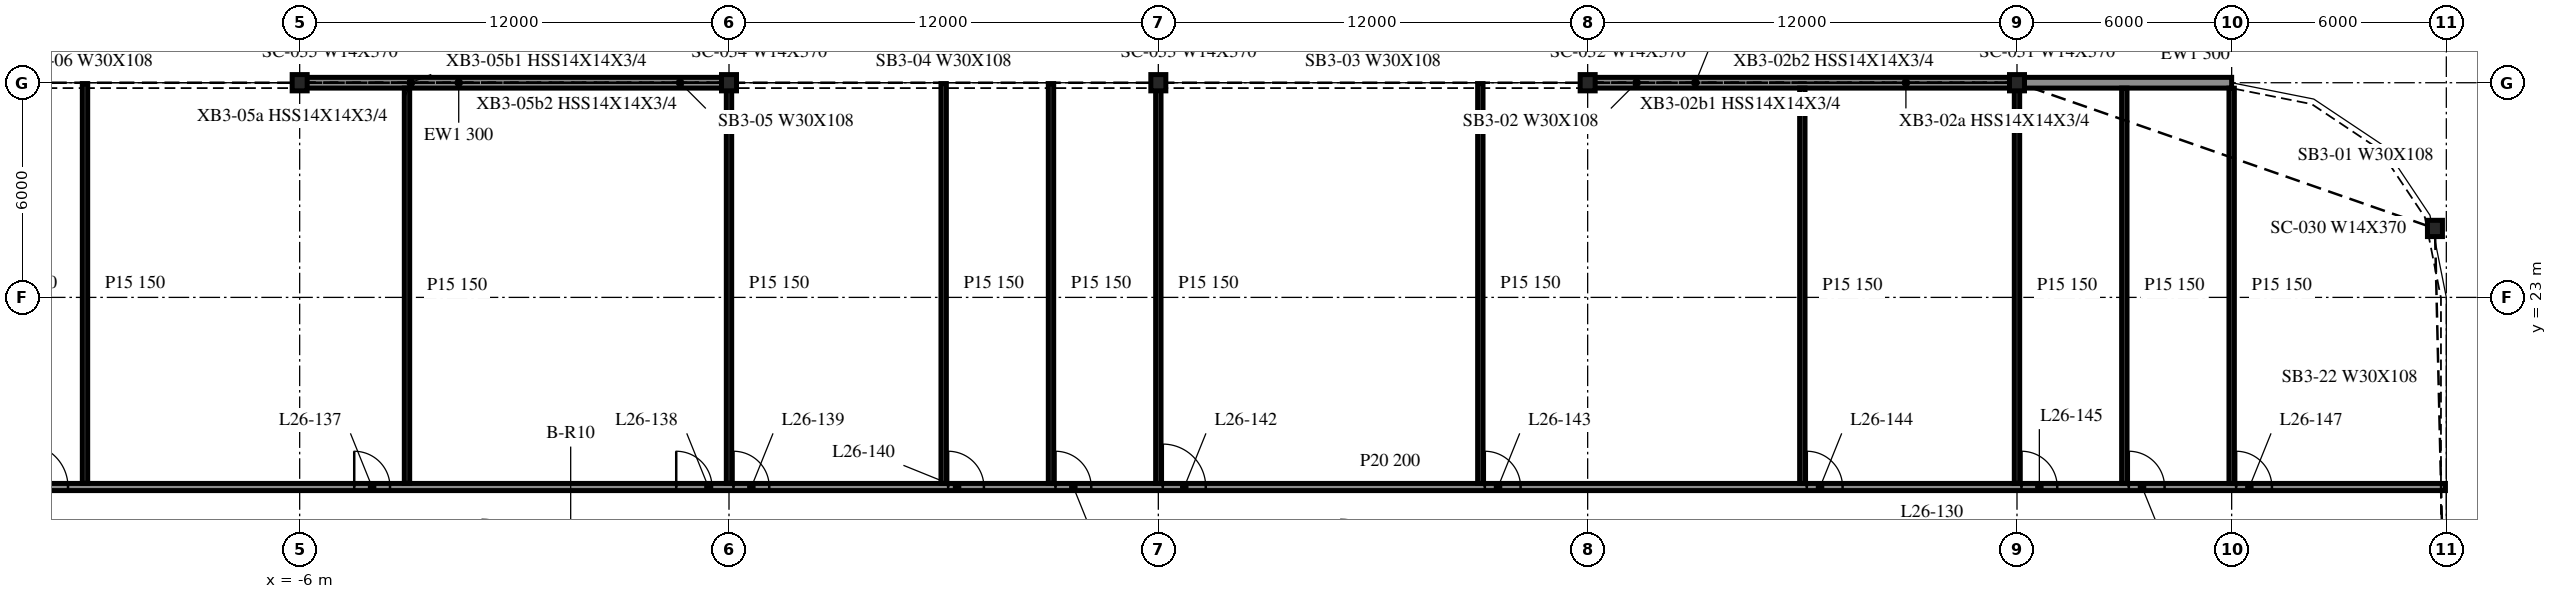
"""IFC4 building model, lengths in metres.
Left out: names, types, materials, properties, quantities, classifications, styles, units other than length and angle.
Written with IfcOpenShell. Run it as: python <this file> out.ifc"""

import sys

from ifc_helpers import new_model, si_unit, direction, frame, frame_2d, origin, origin_2d, place, context, subcontext, project, spatial, rectangle, i_section, extrude, element, fill, save


model = new_model("IFC4")
c1 = context("Model", 3, precision=1e-05, world=origin(), true_north=direction((0.0, 1.0)))
c2 = subcontext(c1, "Body", "Model", "MODEL_VIEW")
j1 = project(units=[si_unit("LENGTHUNIT", "METRE"), si_unit("PLANEANGLEUNIT", "RADIAN")], contexts=[c1])
p1 = place(None, origin())
s1 = spatial("IfcSite", under=j1, at=p1, CompositionType="ELEMENT")
p2 = place(p1, origin())
s2 = spatial("IfcBuilding", under=s1, at=p2, CompositionType="ELEMENT")
p3 = place(p2, frame((0.0, 0.0, 113.5)))
s3 = spatial("IfcBuildingStorey", under=s2, at=p3, CompositionType="ELEMENT", Elevation=113.5)
for number, where, z_axis, x_axis in (
    (1, (53.682, 24.927, -0.34), (0.0, 0.0, 1.0), (1.0, 0.0, 0.0)),
    (2, (42.0, 29.0, -0.34), (0.0, 0.0, 1.0), (1.0, 0.0, 0.0)),
    (3, (30.0, 29.0, -0.34), (0.0, 0.0, 1.0), (1.0, 0.0, 0.0)),
    (4, (18.0, 29.0, -0.34), (0.0, 0.0, 1.0), (1.0, 0.0, 0.0)),
    (5, (6.0, 29.0, -0.34), (0.0, 0.0, 1.0), (1.0, 0.0, 0.0)),
    (6, (-6.0, 29.0, -0.34), (0.0, 0.0, 1.0), (1.0, 0.0, 0.0)),
):
    element("IfcColumn", number, at=place(p3, frame(where, z_axis=z_axis, x_axis=x_axis)), inside=s3, PredefinedType="COLUMN", context=c2, shape_type="SweptSolid", body=[
        extrude(i_section(OverallWidth=0.419, OverallDepth=0.455, WebThickness=0.042, FlangeThickness=0.068, at=origin_2d()), origin(), (0.0, 0.0, 1.0), 3.89),
    ])
p4 = place(p3, frame((48.0, 29.0, 0.0), z_axis=(0.0, 0.0, 1.0), x_axis=(-1.0, 0.0, 0.0)))
e7 = element("IfcWall", 7, at=p4, inside=s3, PredefinedType="NOTDEFINED", context=c2, shape_type="SweptSolid", body=[
    extrude(rectangle(XDim=5.979, YDim=0.3, at=frame_2d((2.99, 0.0))), origin(), (0.0, 0.0, 1.0), 3.55),
])
for number, where, z_axis, x_axis in (
    (8, (41.979, 29.0, 0.0), (0.0, 0.0, 1.0), (-1.0, 0.0, 0.0)),
    (9, (5.979, 29.0, 0.0), (0.0, 0.0, 1.0), (-1.0, 0.0, 0.0)),
):
    element("IfcWall", number, at=place(p3, frame(where, z_axis=z_axis, x_axis=x_axis)), inside=s3, PredefinedType="NOTDEFINED", context=c2, shape_type="SweptSolid", body=[
        extrude(rectangle(XDim=11.958, YDim=0.3, at=frame_2d((5.979, 0.0))), origin(), (0.0, 0.0, 1.0), 3.55),
    ])
p5 = place(p3, frame((-41.975, 17.7, 0.0), z_axis=(0.0, 0.0, 1.0), x_axis=(1.0, 0.0, 0.0)))
e10 = element("IfcWall", 10, at=p5, inside=s3, PredefinedType="PARTITIONING", context=c2, shape_type="SweptSolid", body=[
    extrude(rectangle(XDim=95.95, YDim=0.2, at=frame_2d((47.975, 0.0))), origin(), (0.0, 0.0, 1.0), 3.55),
])
p6 = place(p5, frame((7.5, 0.0, 0.0)))
e11 = element("IfcOpeningElement", 11, at=p6, cuts=e10, PredefinedType="OPENING", context=c2, shape_type="SweptSolid", body=[
    extrude(rectangle(XDim=1.0, YDim=2.1, at=frame_2d((0.5, 1.05))), frame((0.0, 0.11, 0.0), z_axis=(0.0, -1.0, 0.0), x_axis=(1.0, 0.0, 0.0)), (0.0, 0.0, 1.0), 0.22),
])
p7 = place(p5, frame((16.5, 0.0, 0.0)))
e12 = element("IfcOpeningElement", 12, at=p7, cuts=e10, PredefinedType="OPENING", context=c2, shape_type="SweptSolid", body=[
    extrude(rectangle(XDim=1.0, YDim=2.1, at=frame_2d((0.5, 1.05))), frame((0.0, 0.11, 0.0), z_axis=(0.0, -1.0, 0.0), x_axis=(1.0, 0.0, 0.0)), (0.0, 0.0, 1.0), 0.22),
])
p8 = place(p5, frame((22.5, 0.0, 0.0)))
e13 = element("IfcOpeningElement", 13, at=p8, cuts=e10, PredefinedType="OPENING", context=c2, shape_type="SweptSolid", body=[
    extrude(rectangle(XDim=1.0, YDim=2.1, at=frame_2d((0.5, 1.05))), frame((0.0, 0.11, 0.0), z_axis=(0.0, -1.0, 0.0), x_axis=(1.0, 0.0, 0.0)), (0.0, 0.0, 1.0), 0.22),
])
p9 = place(p5, frame((25.5, 0.0, 0.0)))
e14 = element("IfcOpeningElement", 14, at=p9, cuts=e10, PredefinedType="OPENING", context=c2, shape_type="SweptSolid", body=[
    extrude(rectangle(XDim=1.0, YDim=2.1, at=frame_2d((0.5, 1.05))), frame((0.0, 0.11, 0.0), z_axis=(0.0, -1.0, 0.0), x_axis=(1.0, 0.0, 0.0)), (0.0, 0.0, 1.0), 0.22),
])
p10 = place(p5, frame((28.3, 0.0, 0.0)))
e15 = element("IfcOpeningElement", 15, at=p10, cuts=e10, PredefinedType="OPENING", context=c2, shape_type="SweptSolid", body=[
    extrude(rectangle(XDim=1.2, YDim=2.1, at=frame_2d((0.6, 1.05))), frame((0.0, 0.11, 0.0), z_axis=(0.0, -1.0, 0.0), x_axis=(1.0, 0.0, 0.0)), (0.0, 0.0, 1.0), 0.22),
])
p11 = place(p5, frame((37.5, 0.0, 0.0)))
e16 = element("IfcOpeningElement", 16, at=p11, cuts=e10, PredefinedType="OPENING", context=c2, shape_type="SweptSolid", body=[
    extrude(rectangle(XDim=1.0, YDim=2.1, at=frame_2d((0.5, 1.05))), frame((0.0, 0.11, 0.0), z_axis=(0.0, -1.0, 0.0), x_axis=(1.0, 0.0, 0.0)), (0.0, 0.0, 1.0), 0.22),
])
p12 = place(p5, frame((46.5, 0.0, 0.0)))
e17 = element("IfcOpeningElement", 17, at=p12, cuts=e10, PredefinedType="OPENING", context=c2, shape_type="SweptSolid", body=[
    extrude(rectangle(XDim=1.0, YDim=2.1, at=frame_2d((0.5, 1.05))), frame((0.0, 0.11, 0.0), z_axis=(0.0, -1.0, 0.0), x_axis=(1.0, 0.0, 0.0)), (0.0, 0.0, 1.0), 0.22),
])
p13 = place(p5, frame((48.1, 0.0, 0.0)))
e18 = element("IfcOpeningElement", 18, at=p13, cuts=e10, PredefinedType="OPENING", context=c2, shape_type="SweptSolid", body=[
    extrude(rectangle(XDim=1.0, YDim=2.1, at=frame_2d((0.5, 1.05))), frame((0.0, 0.11, 0.0), z_axis=(0.0, -1.0, 0.0), x_axis=(1.0, 0.0, 0.0)), (0.0, 0.0, 1.0), 0.22),
])
p14 = place(p5, frame((54.1, 0.0, 0.0)))
e19 = element("IfcOpeningElement", 19, at=p14, cuts=e10, PredefinedType="OPENING", context=c2, shape_type="SweptSolid", body=[
    extrude(rectangle(XDim=1.0, YDim=2.1, at=frame_2d((0.5, 1.05))), frame((0.0, 0.11, 0.0), z_axis=(0.0, -1.0, 0.0), x_axis=(1.0, 0.0, 0.0)), (0.0, 0.0, 1.0), 0.22),
])
p15 = place(p5, frame((57.1, 0.0, 0.0)))
e20 = element("IfcOpeningElement", 20, at=p15, cuts=e10, PredefinedType="OPENING", context=c2, shape_type="SweptSolid", body=[
    extrude(rectangle(XDim=1.0, YDim=2.1, at=frame_2d((0.5, 1.05))), frame((0.0, 0.11, 0.0), z_axis=(0.0, -1.0, 0.0), x_axis=(1.0, 0.0, 0.0)), (0.0, 0.0, 1.0), 0.22),
])
p16 = place(p5, frame((60.1, 0.0, 0.0)))
e21 = element("IfcOpeningElement", 21, at=p16, cuts=e10, PredefinedType="OPENING", context=c2, shape_type="SweptSolid", body=[
    extrude(rectangle(XDim=1.2, YDim=2.1, at=frame_2d((0.6, 1.05))), frame((0.0, 0.11, 0.0), z_axis=(0.0, -1.0, 0.0), x_axis=(1.0, 0.0, 0.0)), (0.0, 0.0, 1.0), 0.22),
])
p17 = place(p5, frame((69.1, 0.0, 0.0)))
e22 = element("IfcOpeningElement", 22, at=p17, cuts=e10, PredefinedType="OPENING", context=c2, shape_type="SweptSolid", body=[
    extrude(rectangle(XDim=1.0, YDim=2.1, at=frame_2d((0.5, 1.05))), frame((0.0, 0.11, 0.0), z_axis=(0.0, -1.0, 0.0), x_axis=(1.0, 0.0, 0.0)), (0.0, 0.0, 1.0), 0.22),
])
p18 = place(p5, frame((78.1, 0.0, 0.0)))
e23 = element("IfcOpeningElement", 23, at=p18, cuts=e10, PredefinedType="OPENING", context=c2, shape_type="SweptSolid", body=[
    extrude(rectangle(XDim=1.0, YDim=2.1, at=frame_2d((0.5, 1.05))), frame((0.0, 0.11, 0.0), z_axis=(0.0, -1.0, 0.0), x_axis=(1.0, 0.0, 0.0)), (0.0, 0.0, 1.0), 0.22),
])
p19 = place(p5, frame((84.1, 0.0, 0.0)))
e24 = element("IfcOpeningElement", 24, at=p19, cuts=e10, PredefinedType="OPENING", context=c2, shape_type="SweptSolid", body=[
    extrude(rectangle(XDim=1.0, YDim=2.1, at=frame_2d((0.5, 1.05))), frame((0.0, 0.11, 0.0), z_axis=(0.0, -1.0, 0.0), x_axis=(1.0, 0.0, 0.0)), (0.0, 0.0, 1.0), 0.22),
])
p20 = place(p5, frame((87.1, 0.0, 0.0)))
e25 = element("IfcOpeningElement", 25, at=p20, cuts=e10, PredefinedType="OPENING", context=c2, shape_type="SweptSolid", body=[
    extrude(rectangle(XDim=1.0, YDim=2.1, at=frame_2d((0.5, 1.05))), frame((0.0, 0.11, 0.0), z_axis=(0.0, -1.0, 0.0), x_axis=(1.0, 0.0, 0.0)), (0.0, 0.0, 1.0), 0.22),
])
p21 = place(p5, frame((90.1, 0.0, 0.0)))
e26 = element("IfcOpeningElement", 26, at=p21, cuts=e10, PredefinedType="OPENING", context=c2, shape_type="SweptSolid", body=[
    extrude(rectangle(XDim=1.0, YDim=2.1, at=frame_2d((0.5, 1.05))), frame((0.0, 0.11, 0.0), z_axis=(0.0, -1.0, 0.0), x_axis=(1.0, 0.0, 0.0)), (0.0, 0.0, 1.0), 0.22),
])
p22 = place(p3, frame((-12.0, 17.8, 0.0), z_axis=(0.0, 0.0, 1.0), x_axis=(0.0, 1.0, 0.0)))
e27 = element("IfcWall", 27, at=p22, inside=s3, PredefinedType="PARTITIONING", context=c2, shape_type="SweptSolid", body=[
    extrude(rectangle(XDim=11.175, YDim=0.15, at=frame_2d((5.587, 0.0))), origin(), (0.0, 0.0, 1.0), 3.55),
])
p23 = place(p3, frame((-3.0, 17.8, 0.0), z_axis=(0.0, 0.0, 1.0), x_axis=(0.0, 1.0, 0.0)))
e28 = element("IfcWall", 28, at=p23, inside=s3, PredefinedType="PARTITIONING", context=c2, shape_type="SweptSolid", body=[
    extrude(rectangle(XDim=11.05, YDim=0.15, at=frame_2d((5.525, 0.0))), origin(), (0.0, 0.0, 1.0), 3.55),
])
for number, where, z_axis, x_axis in (
    (29, (6.0, 17.8, 0.0), (0.0, 0.0, 1.0), (0.0, 1.0, 0.0)),
    (30, (12.0, 17.8, 0.0), (0.0, 0.0, 1.0), (0.0, 1.0, 0.0)),
    (31, (15.0, 17.8, 0.0), (0.0, 0.0, 1.0), (0.0, 1.0, 0.0)),
    (32, (18.0, 17.8, 0.0), (0.0, 0.0, 1.0), (0.0, 1.0, 0.0)),
    (33, (27.0, 17.8, 0.0), (0.0, 0.0, 1.0), (0.0, 1.0, 0.0)),
):
    element("IfcWall", number, at=place(p3, frame(where, z_axis=z_axis, x_axis=x_axis)), inside=s3, PredefinedType="PARTITIONING", context=c2, shape_type="SweptSolid", body=[
        extrude(rectangle(XDim=11.175, YDim=0.15, at=frame_2d((5.587, 0.0))), origin(), (0.0, 0.0, 1.0), 3.55),
    ])
for number, where, z_axis, x_axis in (
    (34, (36.0, 17.8, 0.0), (0.0, 0.0, 1.0), (0.0, 1.0, 0.0)),
    (35, (42.0, 17.8, 0.0), (0.0, 0.0, 1.0), (0.0, 1.0, 0.0)),
    (36, (45.0, 17.8, 0.0), (0.0, 0.0, 1.0), (0.0, 1.0, 0.0)),
):
    element("IfcWall", number, at=place(p3, frame(where, z_axis=z_axis, x_axis=x_axis)), inside=s3, PredefinedType="PARTITIONING", context=c2, shape_type="SweptSolid", body=[
        extrude(rectangle(XDim=11.05, YDim=0.15, at=frame_2d((5.525, 0.0))), origin(), (0.0, 0.0, 1.0), 3.55),
    ])
p24 = place(p3, frame((48.0, 17.8, 0.0), z_axis=(0.0, 0.0, 1.0), x_axis=(0.0, 1.0, 0.0)))
e37 = element("IfcWall", 37, at=p24, inside=s3, PredefinedType="PARTITIONING", context=c2, shape_type="SweptSolid", body=[
    extrude(rectangle(XDim=11.047, YDim=0.15, at=frame_2d((5.523, 0.0))), origin(), (0.0, 0.0, 1.0), 3.55),
])
p25 = place(p10, origin())
e38 = element("IfcDoor", 38, at=p25, inside=s3, OperationType="SINGLE_SWING_LEFT", PredefinedType="DOOR", context=c2, shape_type="SweptSolid", body=[
    extrude(rectangle(XDim=1.2, YDim=2.1, at=frame_2d((0.6, 1.05))), frame((0.0, 0.025, 0.0), z_axis=(0.0, -1.0, 0.0), x_axis=(1.0, 0.0, 0.0)), (0.0, 0.0, 1.0), 0.05),
])
fill(e15, e38)
p26 = place(p11, origin())
e39 = element("IfcDoor", 39, at=p26, inside=s3, OperationType="SINGLE_SWING_LEFT", PredefinedType="DOOR", context=c2, shape_type="SweptSolid", body=[
    extrude(rectangle(XDim=1.0, YDim=2.1, at=frame_2d((0.5, 1.05))), frame((0.0, 0.025, 0.0), z_axis=(0.0, -1.0, 0.0), x_axis=(1.0, 0.0, 0.0)), (0.0, 0.0, 1.0), 0.05),
])
fill(e16, e39)
p27 = place(p12, origin())
e40 = element("IfcDoor", 40, at=p27, inside=s3, OperationType="SINGLE_SWING_LEFT", PredefinedType="DOOR", context=c2, shape_type="SweptSolid", body=[
    extrude(rectangle(XDim=1.0, YDim=2.1, at=frame_2d((0.5, 1.05))), frame((0.0, 0.025, 0.0), z_axis=(0.0, -1.0, 0.0), x_axis=(1.0, 0.0, 0.0)), (0.0, 0.0, 1.0), 0.05),
])
fill(e17, e40)
p28 = place(p13, origin())
e41 = element("IfcDoor", 41, at=p28, inside=s3, OperationType="SINGLE_SWING_RIGHT", PredefinedType="DOOR", context=c2, shape_type="SweptSolid", body=[
    extrude(rectangle(XDim=1.0, YDim=2.1, at=frame_2d((0.5, 1.05))), frame((0.0, 0.025, 0.0), z_axis=(0.0, -1.0, 0.0), x_axis=(1.0, 0.0, 0.0)), (0.0, 0.0, 1.0), 0.05),
])
fill(e18, e41)
p29 = place(p14, origin())
e42 = element("IfcDoor", 42, at=p29, inside=s3, OperationType="SINGLE_SWING_RIGHT", PredefinedType="DOOR", context=c2, shape_type="SweptSolid", body=[
    extrude(rectangle(XDim=1.0, YDim=2.1, at=frame_2d((0.5, 1.05))), frame((0.0, 0.025, 0.0), z_axis=(0.0, -1.0, 0.0), x_axis=(1.0, 0.0, 0.0)), (0.0, 0.0, 1.0), 0.05),
])
fill(e19, e42)
p30 = place(p15, origin())
e43 = element("IfcDoor", 43, at=p30, inside=s3, OperationType="SINGLE_SWING_RIGHT", PredefinedType="DOOR", context=c2, shape_type="SweptSolid", body=[
    extrude(rectangle(XDim=1.0, YDim=2.1, at=frame_2d((0.5, 1.05))), frame((0.0, 0.025, 0.0), z_axis=(0.0, -1.0, 0.0), x_axis=(1.0, 0.0, 0.0)), (0.0, 0.0, 1.0), 0.05),
])
fill(e20, e43)
p31 = place(p16, origin())
e44 = element("IfcDoor", 44, at=p31, inside=s3, OperationType="SINGLE_SWING_RIGHT", PredefinedType="DOOR", context=c2, shape_type="SweptSolid", body=[
    extrude(rectangle(XDim=1.2, YDim=2.1, at=frame_2d((0.6, 1.05))), frame((0.0, 0.025, 0.0), z_axis=(0.0, -1.0, 0.0), x_axis=(1.0, 0.0, 0.0)), (0.0, 0.0, 1.0), 0.05),
])
fill(e21, e44)
p32 = place(p17, origin())
e45 = element("IfcDoor", 45, at=p32, inside=s3, OperationType="SINGLE_SWING_RIGHT", PredefinedType="DOOR", context=c2, shape_type="SweptSolid", body=[
    extrude(rectangle(XDim=1.0, YDim=2.1, at=frame_2d((0.5, 1.05))), frame((0.0, 0.025, 0.0), z_axis=(0.0, -1.0, 0.0), x_axis=(1.0, 0.0, 0.0)), (0.0, 0.0, 1.0), 0.05),
])
fill(e22, e45)
p33 = place(p18, origin())
e46 = element("IfcDoor", 46, at=p33, inside=s3, OperationType="SINGLE_SWING_RIGHT", PredefinedType="DOOR", context=c2, shape_type="SweptSolid", body=[
    extrude(rectangle(XDim=1.0, YDim=2.1, at=frame_2d((0.5, 1.05))), frame((0.0, 0.025, 0.0), z_axis=(0.0, -1.0, 0.0), x_axis=(1.0, 0.0, 0.0)), (0.0, 0.0, 1.0), 0.05),
])
fill(e23, e46)
p34 = place(p19, origin())
e47 = element("IfcDoor", 47, at=p34, inside=s3, OperationType="SINGLE_SWING_RIGHT", PredefinedType="DOOR", context=c2, shape_type="SweptSolid", body=[
    extrude(rectangle(XDim=1.0, YDim=2.1, at=frame_2d((0.5, 1.05))), frame((0.0, 0.025, 0.0), z_axis=(0.0, -1.0, 0.0), x_axis=(1.0, 0.0, 0.0)), (0.0, 0.0, 1.0), 0.05),
])
fill(e24, e47)
p35 = place(p20, origin())
e48 = element("IfcDoor", 48, at=p35, inside=s3, OperationType="SINGLE_SWING_RIGHT", PredefinedType="DOOR", context=c2, shape_type="SweptSolid", body=[
    extrude(rectangle(XDim=1.0, YDim=2.1, at=frame_2d((0.5, 1.05))), frame((0.0, 0.025, 0.0), z_axis=(0.0, -1.0, 0.0), x_axis=(1.0, 0.0, 0.0)), (0.0, 0.0, 1.0), 0.05),
])
fill(e25, e48)
p36 = place(p21, origin())
e49 = element("IfcDoor", 49, at=p36, inside=s3, OperationType="SINGLE_SWING_RIGHT", PredefinedType="DOOR", context=c2, shape_type="SweptSolid", body=[
    extrude(rectangle(XDim=1.0, YDim=2.1, at=frame_2d((0.5, 1.05))), frame((0.0, 0.025, 0.0), z_axis=(0.0, -1.0, 0.0), x_axis=(1.0, 0.0, 0.0)), (0.0, 0.0, 1.0), 0.05),
])
fill(e26, e49)
save(model, sys.argv[1])
